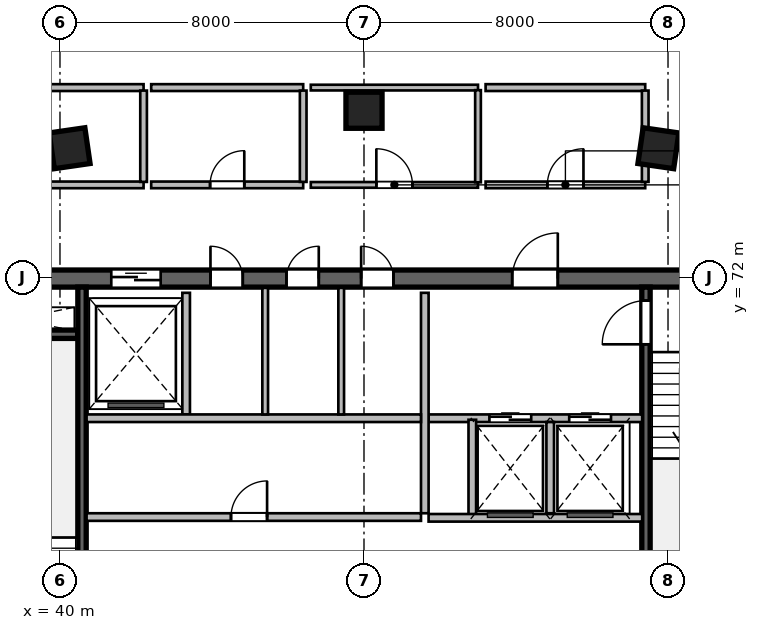
"""IFC4 building model, lengths in metres.
Left out: names, types, materials, properties, quantities, classifications, styles, units other than length and angle.
Written with IfcOpenShell. Run it as: python <this file> out.ifc"""

import sys

from ifc_helpers import new_model, si_unit, direction, frame, frame_2d, origin, origin_2d, place, context, subcontext, project, spatial, rectangle, extrude, source, transform, mapped, element, fill, save


model = new_model("IFC4")
c1 = context("Model", 3, precision=1e-05, world=origin(), true_north=direction((0.0, 1.0)))
c2 = subcontext(c1, "Body", "Model", "MODEL_VIEW")
j1 = project(units=[si_unit("LENGTHUNIT", "METRE"), si_unit("PLANEANGLEUNIT", "RADIAN")], contexts=[c1])
p1 = place(None, origin())
s1 = spatial("IfcSite", under=j1, at=p1, CompositionType="ELEMENT")
p2 = place(p1, origin())
s2 = spatial("IfcBuilding", under=s1, at=p2, CompositionType="ELEMENT")
p3 = place(p2, frame((0.0, 0.0, 243.0)))
s3 = spatial("IfcBuildingStorey", under=s2, at=p3, CompositionType="ELEMENT", Elevation=243.0)
m1 = source(origin(), c2, "Body", "SweptSolid", [
    extrude(rectangle(XDim=21.6, YDim=0.45, at=frame_2d((10.8, 0.0))), origin(), (0.0, 0.0, 1.0), 3.9),
])
p4 = place(p3, frame((37.2, 71.975, 0.0), z_axis=(0.0, 0.0, 1.0), x_axis=(1.0, 0.0, 0.0)))
e1 = element("IfcWall", 1, at=p4, inside=s3, PredefinedType="SHEAR", context=c2, shape_type="MappedRepresentation", body=[
    mapped(m1, transform((0.0, 0.0, 0.0), scale=1.0)),
])
p5 = place(p4, frame((1.2, 0.0, 0.0)))
e2 = element("IfcOpeningElement", 2, at=p5, cuts=e1, PredefinedType="OPENING", context=c2, shape_type="SweptSolid", body=[
    extrude(rectangle(XDim=0.9, YDim=2.1, at=frame_2d((0.45, 1.05))), frame((0.0, 0.235, 0.0), z_axis=(0.0, -1.0, 0.0), x_axis=(1.0, 0.0, 0.0)), (0.0, 0.0, 1.0), 0.47),
])
p6 = place(p4, frame((14.7, 0.0, 0.0)))
e3 = element("IfcOpeningElement", 3, at=p6, cuts=e1, PredefinedType="OPENING", context=c2, shape_type="SweptSolid", body=[
    extrude(rectangle(XDim=1.2, YDim=2.15, at=frame_2d((0.6, 1.075))), frame((0.0, 0.235, 0.0), z_axis=(0.0, -1.0, 0.0), x_axis=(1.0, 0.0, 0.0)), (0.0, 0.0, 1.0), 0.47),
])
p7 = place(p4, frame((4.15, 0.0, 0.0)))
e4 = element("IfcOpeningElement", 4, at=p7, cuts=e1, PredefinedType="OPENING", context=c2, shape_type="SweptSolid", body=[
    extrude(rectangle(XDim=1.3, YDim=2.15, at=frame_2d((0.65, 1.075))), frame((0.0, 0.235, 0.0), z_axis=(0.0, -1.0, 0.0), x_axis=(1.0, 0.0, 0.0)), (0.0, 0.0, 1.0), 0.47),
])
p8 = place(p4, frame((6.76, 0.0, 0.0)))
e5 = element("IfcOpeningElement", 5, at=p8, cuts=e1, PredefinedType="OPENING", context=c2, shape_type="SweptSolid", body=[
    extrude(rectangle(XDim=0.85, YDim=2.1, at=frame_2d((0.425, 1.05))), frame((0.0, 0.235, 0.0), z_axis=(0.0, -1.0, 0.0), x_axis=(1.0, 0.0, 0.0)), (0.0, 0.0, 1.0), 0.47),
])
p9 = place(p4, frame((8.76, 0.0, 0.0)))
e6 = element("IfcOpeningElement", 6, at=p9, cuts=e1, PredefinedType="OPENING", context=c2, shape_type="SweptSolid", body=[
    extrude(rectangle(XDim=0.85, YDim=2.1, at=frame_2d((0.425, 1.05))), frame((0.0, 0.235, 0.0), z_axis=(0.0, -1.0, 0.0), x_axis=(1.0, 0.0, 0.0)), (0.0, 0.0, 1.0), 0.47),
])
p10 = place(p4, frame((10.725, 0.0, 0.0)))
e7 = element("IfcOpeningElement", 7, at=p10, cuts=e1, PredefinedType="OPENING", context=c2, shape_type="SweptSolid", body=[
    extrude(rectangle(XDim=0.85, YDim=2.1, at=frame_2d((0.425, 1.05))), frame((0.0, 0.235, 0.0), z_axis=(0.0, -1.0, 0.0), x_axis=(1.0, 0.0, 0.0)), (0.0, 0.0, 1.0), 0.47),
])
m2 = source(origin(), c2, "Body", "SweptSolid", [
    extrude(rectangle(XDim=3.27, YDim=0.22, at=frame_2d((1.635, 0.0))), origin(), (0.0, 0.0, 1.0), 3.9),
])
p11 = place(p3, frame((37.2, 70.51, 0.0), z_axis=(0.0, 0.0, 1.0), x_axis=(1.0, 0.0, 0.0)))
e8 = element("IfcWall", 8, at=p11, inside=s3, PredefinedType="SHEAR", context=c2, shape_type="MappedRepresentation", body=[
    mapped(m2, transform((0.0, 0.0, 0.0), scale=1.0)),
])
m3 = source(origin(), c2, "Body", "SweptSolid", [
    extrude(rectangle(XDim=11.1, YDim=0.22, at=frame_2d((5.55, 0.0))), origin(), (0.0, 0.0, 1.0), 3.9),
])
p12 = place(p3, frame((40.58, 60.65, 0.0), z_axis=(0.0, 0.0, 1.0), x_axis=(0.0, 1.0, 0.0)))
e9 = element("IfcWall", 9, at=p12, inside=s3, PredefinedType="SHEAR", context=c2, shape_type="MappedRepresentation", body=[
    mapped(m3, transform((0.0, 0.0, 0.0), scale=1.0)),
])
p13 = place(p3, frame((55.42, 60.65, 0.0), z_axis=(0.0, 0.0, 1.0), x_axis=(0.0, 1.0, 0.0)))
e10 = element("IfcWall", 10, at=p13, inside=s3, PredefinedType="SHEAR", context=c2, shape_type="MappedRepresentation", body=[
    mapped(m3, transform((0.0, 0.0, 0.0), scale=1.0)),
])
p14 = place(p13, frame((9.595, 0.0, 0.0)))
e11 = element("IfcOpeningElement", 11, at=p14, cuts=e10, PredefinedType="OPENING", context=c2, shape_type="SweptSolid", body=[
    extrude(rectangle(XDim=1.15, YDim=2.15, at=frame_2d((0.575, 1.075))), frame((0.0, 0.12, 0.0), z_axis=(0.0, -1.0, 0.0), x_axis=(1.0, 0.0, 0.0)), (0.0, 0.0, 1.0), 0.24),
])
m4 = source(origin(), c2, "Body", "SweptSolid", [
    extrude(rectangle(XDim=0.95, YDim=0.95, at=origin_2d()), origin(), (0.0, 0.0, 1.0), 3.9),
])
for number, where, z_axis, x_axis in (
    (12, (40.253, 75.404, 0.0), (0.0, 0.0, 1.0), (-0.143, 0.99, 0.0)),
    (13, (48.0, 76.404, 0.0), (0.0, 0.0, 1.0), (0.0, 1.0, 0.0)),
    (14, (55.747, 75.404, 0.0), (0.0, 0.0, 1.0), (0.143, 0.99, 0.0)),
):
    element("IfcColumn", number, at=place(p3, frame(where, z_axis=z_axis, x_axis=x_axis)), inside=s3, PredefinedType="COLUMN", context=c2, shape_type="MappedRepresentation", body=[
        mapped(m4, transform((0.0, 0.0, 0.0), scale=1.0)),
    ])
m5 = source(origin(), c2, "Body", "SweptSolid", [
    extrude(rectangle(XDim=5.62, YDim=0.2, at=frame_2d((2.81, 0.0))), origin(), (0.0, 0.0, 1.0), 3.65),
])
p15 = place(p3, frame((49.7, 68.3, 0.0), z_axis=(0.0, 0.0, 1.0), x_axis=(1.0, 0.0, 0.0)))
e15 = element("IfcWall", 15, at=p15, inside=s3, PredefinedType="SOLIDWALL", context=c2, shape_type="MappedRepresentation", body=[
    mapped(m5, transform((0.0, 0.0, 0.0), scale=1.0)),
])
p16 = place(p15, frame((1.6, 0.0, 0.0)))
e16 = element("IfcOpeningElement", 16, at=p16, cuts=e15, PredefinedType="OPENING", context=c2, shape_type="SweptSolid", body=[
    extrude(rectangle(XDim=1.1, YDim=2.15, at=frame_2d((0.55, 1.075))), frame((0.0, 0.11, 0.0), z_axis=(0.0, -1.0, 0.0), x_axis=(1.0, 0.0, 0.0)), (0.0, 0.0, 1.0), 0.22),
])
p17 = place(p15, frame((3.7, 0.0, 0.0)))
e17 = element("IfcOpeningElement", 17, at=p17, cuts=e15, PredefinedType="OPENING", context=c2, shape_type="SweptSolid", body=[
    extrude(rectangle(XDim=1.1, YDim=2.15, at=frame_2d((0.55, 1.075))), frame((0.0, 0.11, 0.0), z_axis=(0.0, -1.0, 0.0), x_axis=(1.0, 0.0, 0.0)), (0.0, 0.0, 1.0), 0.22),
])
m6 = source(origin(), c2, "Body", "SweptSolid", [
    extrude(rectangle(XDim=5.8, YDim=0.2, at=frame_2d((2.9, 0.0))), origin(), (0.0, 0.0, 1.0), 3.65),
])
p18 = place(p3, frame((49.6, 65.8, 0.0), z_axis=(0.0, 0.0, 1.0), x_axis=(0.0, 1.0, 0.0)))
e18 = element("IfcWall", 18, at=p18, inside=s3, PredefinedType="SOLIDWALL", context=c2, shape_type="MappedRepresentation", body=[
    mapped(m6, transform((0.0, 0.0, 0.0), scale=1.0)),
])
m7 = source(origin(), c2, "Body", "SweptSolid", [
    extrude(rectangle(XDim=2.58, YDim=0.2, at=frame_2d((1.29, 0.0))), origin(), (0.0, 0.0, 1.0), 3.65),
])
p19 = place(p3, frame((50.85, 65.68, 0.0), z_axis=(0.0, 0.0, 1.0), x_axis=(0.0, 1.0, 0.0)))
e19 = element("IfcWall", 19, at=p19, inside=s3, PredefinedType="SOLIDWALL", context=c2, shape_type="MappedRepresentation", body=[
    mapped(m7, transform((0.0, 0.0, 0.0), scale=1.0)),
])
m8 = source(origin(), c2, "Body", "SweptSolid", [
    extrude(rectangle(XDim=2.4, YDim=0.2, at=frame_2d((1.2, 0.0))), origin(), (0.0, 0.0, 1.0), 3.65),
])
p20 = place(p3, frame((52.9, 65.8, 0.0), z_axis=(0.0, 0.0, 1.0), x_axis=(0.0, 1.0, 0.0)))
e20 = element("IfcWall", 20, at=p20, inside=s3, PredefinedType="SOLIDWALL", context=c2, shape_type="MappedRepresentation", body=[
    mapped(m8, transform((0.0, 0.0, 0.0), scale=1.0)),
])
p21 = place(p3, frame((49.7, 65.68, 0.0), z_axis=(0.0, 0.0, 1.0), x_axis=(1.0, 0.0, 0.0)))
e21 = element("IfcWall", 21, at=p21, inside=s3, PredefinedType="SOLIDWALL", context=c2, shape_type="MappedRepresentation", body=[
    mapped(m5, transform((0.0, 0.0, 0.0), scale=1.0)),
])
m9 = source(origin(), c2, "Body", "SweptSolid", [
    extrude(rectangle(XDim=3.2, YDim=0.2, at=frame_2d((1.6, 0.0))), origin(), (0.0, 0.0, 1.0), 3.65),
])
p22 = place(p3, frame((43.32, 68.4, 0.0), z_axis=(0.0, 0.0, 1.0), x_axis=(0.0, 1.0, 0.0)))
e22 = element("IfcWall", 22, at=p22, inside=s3, PredefinedType="SOLIDWALL", context=c2, shape_type="MappedRepresentation", body=[
    mapped(m9, transform((0.0, 0.0, 0.0), scale=1.0)),
])
m10 = source(origin(), c2, "Body", "SweptSolid", [
    extrude(rectangle(XDim=8.8, YDim=0.2, at=frame_2d((4.4, 0.0))), origin(), (0.0, 0.0, 1.0), 3.65),
])
p23 = place(p3, frame((40.7, 68.3, 0.0), z_axis=(0.0, 0.0, 1.0), x_axis=(1.0, 0.0, 0.0)))
e23 = element("IfcWall", 23, at=p23, inside=s3, PredefinedType="SOLIDWALL", context=c2, shape_type="MappedRepresentation", body=[
    mapped(m10, transform((0.0, 0.0, 0.0), scale=1.0)),
])
m11 = source(origin(), c2, "Body", "SweptSolid", [
    extrude(rectangle(XDim=3.33, YDim=0.15, at=frame_2d((1.665, 0.0))), origin(), (0.0, 0.0, 1.0), 3.65),
])
for number, where, z_axis, x_axis in (
    (24, (45.4, 68.4, 0.0), (0.0, 0.0, 1.0), (0.0, 1.0, 0.0)),
    (25, (47.4, 68.4, 0.0), (0.0, 0.0, 1.0), (0.0, 1.0, 0.0)),
):
    element("IfcWall", number, at=place(p3, frame(where, z_axis=z_axis, x_axis=x_axis)), inside=s3, PredefinedType="PARTITIONING", context=c2, shape_type="MappedRepresentation", body=[
        mapped(m11, transform((0.0, 0.0, 0.0), scale=1.0)),
    ])
p24 = place(p3, frame((40.7, 65.7, 0.0), z_axis=(0.0, 0.0, 1.0), x_axis=(1.0, 0.0, 0.0)))
e26 = element("IfcWall", 26, at=p24, inside=s3, PredefinedType="SOLIDWALL", context=c2, shape_type="MappedRepresentation", body=[
    mapped(m10, transform((0.0, 0.0, 0.0), scale=1.0)),
])
p25 = place(p24, frame((3.8, 0.0, 0.0)))
e27 = element("IfcOpeningElement", 27, at=p25, cuts=e26, PredefinedType="OPENING", context=c2, shape_type="SweptSolid", body=[
    extrude(rectangle(XDim=0.95, YDim=2.15, at=frame_2d((0.475, 1.075))), frame((0.0, 0.11, 0.0), z_axis=(0.0, -1.0, 0.0), x_axis=(1.0, 0.0, 0.0)), (0.0, 0.0, 1.0), 0.22),
])
m12 = source(origin(), c2, "Body", "SweptSolid", [
    extrude(rectangle(XDim=4.0, YDim=0.175, at=frame_2d((2.0, 0.0))), origin(), (0.0, 0.0, 1.0), 3.65),
])
p26 = place(p3, frame((38.2, 74.44, 0.0), z_axis=(0.0, 0.0, 1.0), x_axis=(1.0, 0.0, 0.0)))
e28 = element("IfcWall", 28, at=p26, inside=s3, PredefinedType="PARTITIONING", context=c2, shape_type="MappedRepresentation", body=[
    mapped(m12, transform((0.0, 0.0, 0.0), scale=1.0)),
])
p27 = place(p26, frame((0.4, 0.0, 0.0)))
e29 = element("IfcOpeningElement", 29, at=p27, cuts=e28, PredefinedType="OPENING", context=c2, shape_type="SweptSolid", body=[
    extrude(rectangle(XDim=0.9, YDim=2.08, at=frame_2d((0.45, 1.04))), frame((0.0, 0.098, 0.0), z_axis=(0.0, -1.0, 0.0), x_axis=(1.0, 0.0, 0.0)), (0.0, 0.0, 1.0), 0.195),
])
m13 = source(origin(), c2, "Body", "SweptSolid", [
    extrude(rectangle(XDim=4.0, YDim=0.18, at=frame_2d((2.0, 0.0))), origin(), (0.0, 0.0, 1.0), 3.65),
])
p28 = place(p3, frame((38.2, 77.0, 0.0), z_axis=(0.0, 0.0, 1.0), x_axis=(1.0, 0.0, 0.0)))
e30 = element("IfcWall", 30, at=p28, inside=s3, PredefinedType="PLUMBINGWALL", context=c2, shape_type="MappedRepresentation", body=[
    mapped(m13, transform((0.0, 0.0, 0.0), scale=1.0)),
])
m14 = source(origin(), c2, "Body", "SweptSolid", [
    extrude(rectangle(XDim=2.403, YDim=0.175, at=frame_2d((1.201, 0.0))), origin(), (0.0, 0.0, 1.0), 3.65),
])
p29 = place(p3, frame((42.2, 74.519, 0.0), z_axis=(0.0, 0.0, 1.0), x_axis=(0.0, 1.0, 0.0)))
e31 = element("IfcWall", 31, at=p29, inside=s3, PredefinedType="PARTITIONING", context=c2, shape_type="MappedRepresentation", body=[
    mapped(m14, transform((0.0, 0.0, 0.0), scale=1.0)),
])
p30 = place(p3, frame((42.4, 74.44, 0.0), z_axis=(0.0, 0.0, 1.0), x_axis=(1.0, 0.0, 0.0)))
e32 = element("IfcWall", 32, at=p30, inside=s3, PredefinedType="PARTITIONING", context=c2, shape_type="MappedRepresentation", body=[
    mapped(m12, transform((0.0, 0.0, 0.0), scale=1.0)),
])
p31 = place(p30, frame((1.55, 0.0, 0.0)))
e33 = element("IfcOpeningElement", 33, at=p31, cuts=e32, PredefinedType="OPENING", context=c2, shape_type="SweptSolid", body=[
    extrude(rectangle(XDim=0.9, YDim=2.08, at=frame_2d((0.45, 1.04))), frame((0.0, 0.098, 0.0), z_axis=(0.0, -1.0, 0.0), x_axis=(1.0, 0.0, 0.0)), (0.0, 0.0, 1.0), 0.195),
])
p32 = place(p3, frame((42.4, 77.0, 0.0), z_axis=(0.0, 0.0, 1.0), x_axis=(1.0, 0.0, 0.0)))
e34 = element("IfcWall", 34, at=p32, inside=s3, PredefinedType="PLUMBINGWALL", context=c2, shape_type="MappedRepresentation", body=[
    mapped(m13, transform((0.0, 0.0, 0.0), scale=1.0)),
])
p33 = place(p3, frame((46.4, 74.519, 0.0), z_axis=(0.0, 0.0, 1.0), x_axis=(0.0, 1.0, 0.0)))
e35 = element("IfcWall", 35, at=p33, inside=s3, PredefinedType="PARTITIONING", context=c2, shape_type="MappedRepresentation", body=[
    mapped(m14, transform((0.0, 0.0, 0.0), scale=1.0)),
])
m15 = source(origin(), c2, "Body", "SweptSolid", [
    extrude(rectangle(XDim=4.4, YDim=0.15, at=frame_2d((2.2, 0.0))), origin(), (0.0, 0.0, 1.0), 3.65),
])
p34 = place(p3, frame((46.6, 74.44, 0.0), z_axis=(0.0, 0.0, 1.0), x_axis=(1.0, 0.0, 0.0)))
e36 = element("IfcWall", 36, at=p34, inside=s3, PredefinedType="PARTITIONING", context=c2, shape_type="MappedRepresentation", body=[
    mapped(m15, transform((0.0, 0.0, 0.0), scale=1.0)),
])
p35 = place(p34, frame((1.725, 0.0, 0.0)))
e37 = element("IfcOpeningElement", 37, at=p35, cuts=e36, PredefinedType="OPENING", context=c2, shape_type="SweptSolid", body=[
    extrude(rectangle(XDim=0.95, YDim=2.1, at=frame_2d((0.475, 1.05))), frame((0.0, 0.085, 0.0), z_axis=(0.0, -1.0, 0.0), x_axis=(1.0, 0.0, 0.0)), (0.0, 0.0, 1.0), 0.17),
])
p36 = place(p3, frame((46.6, 77.0, 0.0), z_axis=(0.0, 0.0, 1.0), x_axis=(1.0, 0.0, 0.0)))
e38 = element("IfcWall", 38, at=p36, inside=s3, PredefinedType="PARTITIONING", context=c2, shape_type="MappedRepresentation", body=[
    mapped(m15, transform((0.0, 0.0, 0.0), scale=1.0)),
])
m16 = source(origin(), c2, "Body", "SweptSolid", [
    extrude(rectangle(XDim=2.425, YDim=0.15, at=frame_2d((1.212, 0.0))), origin(), (0.0, 0.0, 1.0), 3.65),
])
p37 = place(p3, frame((51.0, 74.508, 0.0), z_axis=(0.0, 0.0, 1.0), x_axis=(0.0, 1.0, 0.0)))
e39 = element("IfcWall", 39, at=p37, inside=s3, PredefinedType="PARTITIONING", context=c2, shape_type="MappedRepresentation", body=[
    mapped(m16, transform((0.0, 0.0, 0.0), scale=1.0)),
])
m17 = source(origin(), c2, "Body", "SweptSolid", [
    extrude(rectangle(XDim=4.2, YDim=0.175, at=frame_2d((2.1, 0.0))), origin(), (0.0, 0.0, 1.0), 3.65),
])
p38 = place(p3, frame((51.2, 74.44, 0.0), z_axis=(0.0, 0.0, 1.0), x_axis=(1.0, 0.0, 0.0)))
e40 = element("IfcWall", 40, at=p38, inside=s3, PredefinedType="PARTITIONING", context=c2, shape_type="MappedRepresentation", body=[
    mapped(m17, transform((0.0, 0.0, 0.0), scale=1.0)),
])
p39 = place(p38, frame((1.625, 0.0, 0.0)))
e41 = element("IfcOpeningElement", 41, at=p39, cuts=e40, PredefinedType="OPENING", context=c2, shape_type="SweptSolid", body=[
    extrude(rectangle(XDim=0.95, YDim=2.12, at=frame_2d((0.475, 1.06))), frame((0.0, 0.098, 0.0), z_axis=(0.0, -1.0, 0.0), x_axis=(1.0, 0.0, 0.0)), (0.0, 0.0, 1.0), 0.195),
])
m18 = source(origin(), c2, "Body", "SweptSolid", [
    extrude(rectangle(XDim=4.2, YDim=0.18, at=frame_2d((2.1, 0.0))), origin(), (0.0, 0.0, 1.0), 3.65),
])
p40 = place(p3, frame((51.2, 77.0, 0.0), z_axis=(0.0, 0.0, 1.0), x_axis=(1.0, 0.0, 0.0)))
e42 = element("IfcWall", 42, at=p40, inside=s3, PredefinedType="PLUMBINGWALL", context=c2, shape_type="MappedRepresentation", body=[
    mapped(m18, transform((0.0, 0.0, 0.0), scale=1.0)),
])
p41 = place(p3, frame((55.4, 74.519, 0.0), z_axis=(0.0, 0.0, 1.0), x_axis=(0.0, 1.0, 0.0)))
e43 = element("IfcWall", 43, at=p41, inside=s3, PredefinedType="PARTITIONING", context=c2, shape_type="MappedRepresentation", body=[
    mapped(m14, transform((0.0, 0.0, 0.0), scale=1.0)),
])
m19 = source(origin(), c2, "Body", "SweptSolid", [
    extrude(rectangle(XDim=1.15, YDim=2.15, at=frame_2d((0.575, 1.075))), frame((0.0, 0.025, 0.0), z_axis=(0.0, -1.0, 0.0), x_axis=(1.0, 0.0, 0.0)), (0.0, 0.0, 1.0), 0.05),
])
p42 = place(p14, origin())
e44 = element("IfcDoor", 44, at=p42, inside=s3, OperationType="SINGLE_SWING_LEFT", PredefinedType="DOOR", context=c2, shape_type="MappedRepresentation", body=[
    mapped(m19, transform((0.0, 0.0, 0.0), scale=1.0)),
])
fill(e11, e44)
m20 = source(origin(), c2, "Body", "SweptSolid", [
    extrude(rectangle(XDim=1.2, YDim=2.15, at=frame_2d((0.6, 1.075))), frame((0.0, 0.025, 0.0), z_axis=(0.0, -1.0, 0.0), x_axis=(1.0, 0.0, 0.0)), (0.0, 0.0, 1.0), 0.05),
])
p43 = place(p6, origin())
e45 = element("IfcDoor", 45, at=p43, inside=s3, OperationType="SINGLE_SWING_RIGHT", PredefinedType="DOOR", context=c2, shape_type="MappedRepresentation", body=[
    mapped(m20, transform((0.0, 0.0, 0.0), scale=1.0)),
])
fill(e3, e45)
m21 = source(origin(), c2, "Body", "SweptSolid", [
    extrude(rectangle(XDim=1.1, YDim=2.15, at=frame_2d((0.55, 1.075))), frame((0.0, 0.025, 0.0), z_axis=(0.0, -1.0, 0.0), x_axis=(1.0, 0.0, 0.0)), (0.0, 0.0, 1.0), 0.05),
])
p44 = place(p16, origin())
e46 = element("IfcDoor", 46, at=p44, inside=s3, OperationType="DOUBLE_DOOR_SLIDING", PredefinedType="DOOR", context=c2, shape_type="MappedRepresentation", body=[
    mapped(m21, transform((0.0, 0.0, 0.0), scale=1.0)),
])
fill(e16, e46)
p45 = place(p17, origin())
e47 = element("IfcDoor", 47, at=p45, inside=s3, OperationType="DOUBLE_DOOR_SLIDING", PredefinedType="DOOR", context=c2, shape_type="MappedRepresentation", body=[
    mapped(m21, transform((0.0, 0.0, 0.0), scale=1.0)),
])
fill(e17, e47)
m22 = source(origin(), c2, "Body", "SweptSolid", [
    extrude(rectangle(XDim=1.3, YDim=2.15, at=frame_2d((0.65, 1.075))), frame((0.0, 0.025, 0.0), z_axis=(0.0, -1.0, 0.0), x_axis=(1.0, 0.0, 0.0)), (0.0, 0.0, 1.0), 0.05),
])
p46 = place(p7, origin())
e48 = element("IfcDoor", 48, at=p46, inside=s3, OperationType="DOUBLE_DOOR_SLIDING", PredefinedType="DOOR", context=c2, shape_type="MappedRepresentation", body=[
    mapped(m22, transform((0.0, 0.0, 0.0), scale=1.0)),
])
fill(e4, e48)
m23 = source(origin(), c2, "Body", "SweptSolid", [
    extrude(rectangle(XDim=0.85, YDim=2.1, at=frame_2d((0.425, 1.05))), frame((0.0, 0.025, 0.0), z_axis=(0.0, -1.0, 0.0), x_axis=(1.0, 0.0, 0.0)), (0.0, 0.0, 1.0), 0.05),
])
p47 = place(p8, origin())
e49 = element("IfcDoor", 49, at=p47, inside=s3, OperationType="SINGLE_SWING_LEFT", PredefinedType="DOOR", context=c2, shape_type="MappedRepresentation", body=[
    mapped(m23, transform((0.0, 0.0, 0.0), scale=1.0)),
])
fill(e5, e49)
p48 = place(p9, origin())
e50 = element("IfcDoor", 50, at=p48, inside=s3, OperationType="SINGLE_SWING_RIGHT", PredefinedType="DOOR", context=c2, shape_type="MappedRepresentation", body=[
    mapped(m23, transform((0.0, 0.0, 0.0), scale=1.0)),
])
fill(e6, e50)
p49 = place(p10, origin())
e51 = element("IfcDoor", 51, at=p49, inside=s3, OperationType="SINGLE_SWING_LEFT", PredefinedType="DOOR", context=c2, shape_type="MappedRepresentation", body=[
    mapped(m23, transform((0.0, 0.0, 0.0), scale=1.0)),
])
fill(e7, e51)
m24 = source(origin(), c2, "Body", "SweptSolid", [
    extrude(rectangle(XDim=0.95, YDim=2.15, at=frame_2d((0.475, 1.075))), frame((0.0, 0.025, 0.0), z_axis=(0.0, -1.0, 0.0), x_axis=(1.0, 0.0, 0.0)), (0.0, 0.0, 1.0), 0.05),
])
p50 = place(p25, origin())
e52 = element("IfcDoor", 52, at=p50, inside=s3, OperationType="SINGLE_SWING_RIGHT", PredefinedType="DOOR", context=c2, shape_type="MappedRepresentation", body=[
    mapped(m24, transform((0.0, 0.0, 0.0), scale=1.0)),
])
fill(e27, e52)
m25 = source(origin(), c2, "Body", "SweptSolid", [
    extrude(rectangle(XDim=0.9, YDim=2.08, at=frame_2d((0.45, 1.04))), frame((0.0, 0.025, 0.0), z_axis=(0.0, -1.0, 0.0), x_axis=(1.0, 0.0, 0.0)), (0.0, 0.0, 1.0), 0.05),
])
p51 = place(p31, origin())
e53 = element("IfcDoor", 53, at=p51, inside=s3, OperationType="SINGLE_SWING_RIGHT", PredefinedType="DOOR", context=c2, shape_type="MappedRepresentation", body=[
    mapped(m25, transform((0.0, 0.0, 0.0), scale=1.0)),
])
fill(e33, e53)
m26 = source(origin(), c2, "Body", "SweptSolid", [
    extrude(rectangle(XDim=0.95, YDim=2.1, at=frame_2d((0.475, 1.05))), frame((0.0, 0.025, 0.0), z_axis=(0.0, -1.0, 0.0), x_axis=(1.0, 0.0, 0.0)), (0.0, 0.0, 1.0), 0.05),
])
p52 = place(p35, origin())
e54 = element("IfcDoor", 54, at=p52, inside=s3, OperationType="SINGLE_SWING_LEFT", PredefinedType="DOOR", context=c2, shape_type="MappedRepresentation", body=[
    mapped(m26, transform((0.0, 0.0, 0.0), scale=1.0)),
])
fill(e37, e54)
m27 = source(origin(), c2, "Body", "SweptSolid", [
    extrude(rectangle(XDim=0.95, YDim=2.12, at=frame_2d((0.475, 1.06))), frame((0.0, 0.025, 0.0), z_axis=(0.0, -1.0, 0.0), x_axis=(1.0, 0.0, 0.0)), (0.0, 0.0, 1.0), 0.05),
])
p53 = place(p39, origin())
e55 = element("IfcDoor", 55, at=p53, inside=s3, OperationType="SINGLE_SWING_RIGHT", PredefinedType="DOOR", context=c2, shape_type="MappedRepresentation", body=[
    mapped(m27, transform((0.0, 0.0, 0.0), scale=1.0)),
])
fill(e41, e55)
save(model, sys.argv[1])
